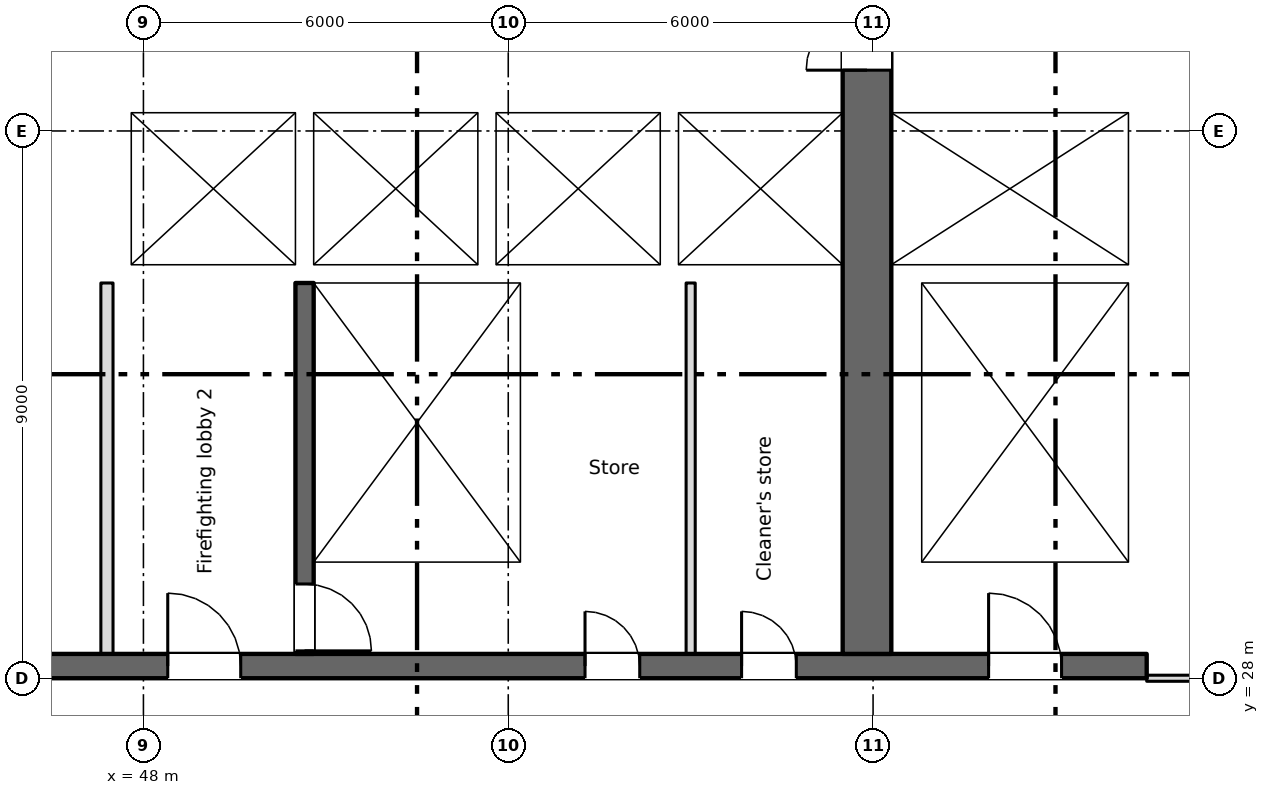
"""IFC4 building model, lengths in metres.
Left out: names, types, materials, properties, quantities, classifications, styles, units other than length and angle.
Written with IfcOpenShell. Run it as: python <this file> out.ifc"""

import sys

from ifc_helpers import new_model, si_unit, direction, frame, frame_2d, origin, place, context, subcontext, project, spatial, rectangle, extrude, element, fill, save


model = new_model("IFC4")
c1 = context("Model", 3, precision=1e-05, world=origin(), true_north=direction((0.0, 1.0)))
c2 = subcontext(c1, "Body", "Model", "MODEL_VIEW")
j1 = project(units=[si_unit("LENGTHUNIT", "METRE"), si_unit("PLANEANGLEUNIT", "RADIAN")], contexts=[c1])
p1 = place(None, origin())
s1 = spatial("IfcSite", under=j1, at=p1, CompositionType="ELEMENT")
p2 = place(p1, origin())
s2 = spatial("IfcBuilding", under=s1, at=p2, CompositionType="ELEMENT")
p3 = place(p2, frame((0.0, 0.0, 102.5)))
s3 = spatial("IfcBuildingStorey", under=s2, at=p3, CompositionType="ELEMENT", Elevation=102.5)
p4 = place(p3, frame((6.7, 28.2, 0.0), z_axis=(0.0, 0.0, 1.0), x_axis=(1.0, 0.0, 0.0)))
e1 = element("IfcWall", 1, at=p4, inside=s3, PredefinedType="SHEAR", context=c2, shape_type="SweptSolid", body=[
    extrude(rectangle(XDim=57.8, YDim=0.4, at=frame_2d((28.9, 0.0))), origin(), (0.0, 0.0, 1.0), 3.35),
])
p5 = place(p4, frame((13.85, 0.0, 0.0)))
e2 = element("IfcOpeningElement", 2, at=p5, cuts=e1, PredefinedType="OPENING", context=c2, shape_type="SweptSolid", body=[
    extrude(rectangle(XDim=0.9, YDim=2.1, at=frame_2d((0.45, 1.05))), frame((0.0, 0.21, 0.0), z_axis=(0.0, -1.0, 0.0), x_axis=(1.0, 0.0, 0.0)), (0.0, 0.0, 1.0), 0.42),
])
p6 = place(p4, frame((48.562, 0.0, 0.0)))
e3 = element("IfcOpeningElement", 3, at=p6, cuts=e1, PredefinedType="OPENING", context=c2, shape_type="SweptSolid", body=[
    extrude(rectangle(XDim=0.9, YDim=2.1, at=frame_2d((0.45, 1.05))), frame((0.0, 0.21, 0.0), z_axis=(0.0, -1.0, 0.0), x_axis=(1.0, 0.0, 0.0)), (0.0, 0.0, 1.0), 0.42),
])
p7 = place(p4, frame((51.137, 0.0, 0.0)))
e4 = element("IfcOpeningElement", 4, at=p7, cuts=e1, PredefinedType="OPENING", context=c2, shape_type="SweptSolid", body=[
    extrude(rectangle(XDim=0.9, YDim=2.1, at=frame_2d((0.45, 1.05))), frame((0.0, 0.21, 0.0), z_axis=(0.0, -1.0, 0.0), x_axis=(1.0, 0.0, 0.0)), (0.0, 0.0, 1.0), 0.42),
])
p8 = place(p4, frame((1.35, 0.0, 0.0)))
e5 = element("IfcOpeningElement", 5, at=p8, cuts=e1, PredefinedType="OPENING", context=c2, shape_type="SweptSolid", body=[
    extrude(rectangle(XDim=0.9, YDim=2.1, at=frame_2d((0.45, 1.05))), frame((0.0, 0.21, 0.0), z_axis=(0.0, -1.0, 0.0), x_axis=(1.0, 0.0, 0.0)), (0.0, 0.0, 1.0), 0.42),
])
p9 = place(p4, frame((4.7, 0.0, 0.0)))
e6 = element("IfcOpeningElement", 6, at=p9, cuts=e1, PredefinedType="OPENING", context=c2, shape_type="SweptSolid", body=[
    extrude(rectangle(XDim=1.2, YDim=2.1, at=frame_2d((0.6, 1.05))), frame((0.0, 0.21, 0.0), z_axis=(0.0, -1.0, 0.0), x_axis=(1.0, 0.0, 0.0)), (0.0, 0.0, 1.0), 0.42),
])
p10 = place(p4, frame((31.7, 0.0, 0.0)))
e7 = element("IfcOpeningElement", 7, at=p10, cuts=e1, PredefinedType="OPENING", context=c2, shape_type="SweptSolid", body=[
    extrude(rectangle(XDim=1.2, YDim=2.1, at=frame_2d((0.6, 1.05))), frame((0.0, 0.21, 0.0), z_axis=(0.0, -1.0, 0.0), x_axis=(1.0, 0.0, 0.0)), (0.0, 0.0, 1.0), 0.42),
])
p11 = place(p4, frame((55.2, 0.0, 0.0)))
e8 = element("IfcOpeningElement", 8, at=p11, cuts=e1, PredefinedType="OPENING", context=c2, shape_type="SweptSolid", body=[
    extrude(rectangle(XDim=1.2, YDim=2.1, at=frame_2d((0.6, 1.05))), frame((0.0, 0.21, 0.0), z_axis=(0.0, -1.0, 0.0), x_axis=(1.0, 0.0, 0.0)), (0.0, 0.0, 1.0), 0.42),
])
p12 = place(p4, frame((21.7, 0.0, 0.0)))
e9 = element("IfcOpeningElement", 9, at=p12, cuts=e1, PredefinedType="OPENING", context=c2, shape_type="SweptSolid", body=[
    extrude(rectangle(XDim=1.2, YDim=2.1, at=frame_2d((0.6, 1.05))), frame((0.0, 0.21, 0.0), z_axis=(0.0, -1.0, 0.0), x_axis=(1.0, 0.0, 0.0)), (0.0, 0.0, 1.0), 0.42),
])
p13 = place(p4, frame((41.7, 0.0, 0.0)))
e10 = element("IfcOpeningElement", 10, at=p13, cuts=e1, PredefinedType="OPENING", context=c2, shape_type="SweptSolid", body=[
    extrude(rectangle(XDim=1.2, YDim=2.1, at=frame_2d((0.6, 1.05))), frame((0.0, 0.21, 0.0), z_axis=(0.0, -1.0, 0.0), x_axis=(1.0, 0.0, 0.0)), (0.0, 0.0, 1.0), 0.42),
])
p14 = place(p4, frame((24.85, 0.0, 0.0)))
e11 = element("IfcOpeningElement", 11, at=p14, cuts=e1, PredefinedType="OPENING", context=c2, shape_type="SweptSolid", body=[
    extrude(rectangle(XDim=2.4, YDim=2.1, at=frame_2d((1.2, 1.05))), frame((0.0, 0.21, 0.0), z_axis=(0.0, -1.0, 0.0), x_axis=(1.0, 0.0, 0.0)), (0.0, 0.0, 1.0), 0.42),
])
p15 = place(p4, frame((37.35, 0.0, 0.0)))
e12 = element("IfcOpeningElement", 12, at=p15, cuts=e1, PredefinedType="OPENING", context=c2, shape_type="SweptSolid", body=[
    extrude(rectangle(XDim=2.4, YDim=2.1, at=frame_2d((1.2, 1.05))), frame((0.0, 0.21, 0.0), z_axis=(0.0, -1.0, 0.0), x_axis=(1.0, 0.0, 0.0)), (0.0, 0.0, 1.0), 0.42),
])
p16 = place(p4, frame((7.95, 0.0, 0.0)))
e13 = element("IfcOpeningElement", 13, at=p16, cuts=e1, PredefinedType="OPENING", context=c2, shape_type="SweptSolid", body=[
    extrude(rectangle(XDim=2.4, YDim=2.1, at=frame_2d((1.2, 1.05))), frame((0.0, 0.21, 0.0), z_axis=(0.0, -1.0, 0.0), x_axis=(1.0, 0.0, 0.0)), (0.0, 0.0, 1.0), 0.42),
])
p17 = place(p4, frame((28.85, 0.0, 0.0)))
e14 = element("IfcOpeningElement", 14, at=p17, cuts=e1, PredefinedType="OPENING", context=c2, shape_type="SweptSolid", body=[
    extrude(rectangle(XDim=0.9, YDim=2.1, at=frame_2d((0.45, 1.05))), frame((0.0, 0.21, 0.0), z_axis=(0.0, -1.0, 0.0), x_axis=(1.0, 0.0, 0.0)), (0.0, 0.0, 1.0), 0.42),
])
p18 = place(p4, frame((34.85, 0.0, 0.0)))
e15 = element("IfcOpeningElement", 15, at=p18, cuts=e1, PredefinedType="OPENING", context=c2, shape_type="SweptSolid", body=[
    extrude(rectangle(XDim=0.9, YDim=2.1, at=frame_2d((0.45, 1.05))), frame((0.0, 0.21, 0.0), z_axis=(0.0, -1.0, 0.0), x_axis=(1.0, 0.0, 0.0)), (0.0, 0.0, 1.0), 0.42),
])
p19 = place(p3, frame((64.35, 34.8, 0.0), z_axis=(0.0, 0.0, 1.0), x_axis=(0.0, 1.0, 0.0)))
e16 = element("IfcWall", 16, at=p19, inside=s3, PredefinedType="SHEAR", context=c2, shape_type="SweptSolid", body=[
    extrude(rectangle(XDim=10.4, YDim=0.3, at=frame_2d((5.2, 0.0))), origin(), (0.0, 0.0, 1.0), 3.35),
])
p20 = place(p3, frame((59.9, 28.4, 0.0), z_axis=(0.0, 0.0, 1.0), x_axis=(0.0, 1.0, 0.0)))
e17 = element("IfcWall", 17, at=p20, inside=s3, PredefinedType="SHEAR", context=c2, shape_type="SweptSolid", body=[
    extrude(rectangle(XDim=16.8, YDim=0.8, at=frame_2d((8.4, 0.0))), origin(), (0.0, 0.0, 1.0), 3.35),
])
p21 = place(p20, frame((9.6, 0.0, 0.0)))
e18 = element("IfcOpeningElement", 18, at=p21, cuts=e17, PredefinedType="OPENING", context=c2, shape_type="SweptSolid", body=[
    extrude(rectangle(XDim=2.0, YDim=2.1, at=frame_2d((1.0, 1.05))), frame((0.0, 0.41, 0.0), z_axis=(0.0, -1.0, 0.0), x_axis=(1.0, 0.0, 0.0)), (0.0, 0.0, 1.0), 0.82),
])
p22 = place(p20, frame((15.35, 0.0, 0.0)))
e19 = element("IfcOpeningElement", 19, at=p22, cuts=e17, PredefinedType="OPENING", context=c2, shape_type="SweptSolid", body=[
    extrude(rectangle(XDim=1.2, YDim=2.1, at=frame_2d((0.6, 1.05))), frame((0.0, 0.41, 0.0), z_axis=(0.0, -1.0, 0.0), x_axis=(1.0, 0.0, 0.0)), (0.0, 0.0, 1.0), 0.82),
])
p23 = place(p3, frame((50.65, 34.5, 0.0), z_axis=(0.0, 0.0, 1.0), x_axis=(0.0, -1.0, 0.0)))
e20 = element("IfcWall", 20, at=p23, inside=s3, PredefinedType="SHEAR", context=c2, shape_type="SweptSolid", body=[
    extrude(rectangle(XDim=6.1, YDim=0.3, at=frame_2d((3.05, 0.0))), origin(), (0.0, 0.0, 1.0), 3.35),
])
p24 = place(p23, frame((4.95, 0.0, 0.0)))
e21 = element("IfcOpeningElement", 21, at=p24, cuts=e20, PredefinedType="OPENING", context=c2, shape_type="SweptSolid", body=[
    extrude(rectangle(XDim=1.1, YDim=2.1, at=frame_2d((0.55, 1.05))), frame((0.0, 0.16, 0.0), z_axis=(0.0, -1.0, 0.0), x_axis=(1.0, 0.0, 0.0)), (0.0, 0.0, 1.0), 0.32),
])
p25 = place(p3, frame((54.35, 28.4, 0.0), z_axis=(0.0, 0.0, 1.0), x_axis=(0.0, 1.0, 0.0)))
e22 = element("IfcWall", 22, at=p25, inside=s3, PredefinedType="SHEAR", context=c2, shape_type="SweptSolid", body=[
    extrude(rectangle(XDim=6.1, YDim=0.3, at=frame_2d((3.05, 0.0))), origin(), (0.0, 0.0, 1.0), 3.35),
])
p26 = place(p3, frame((60.55, 28.4, 0.0), z_axis=(0.0, 0.0, 1.0), x_axis=(0.0, 1.0, 0.0)))
e23 = element("IfcWall", 23, at=p26, inside=s3, PredefinedType="SHEAR", context=c2, shape_type="SweptSolid", body=[
    extrude(rectangle(XDim=6.1, YDim=0.5, at=frame_2d((3.05, 0.0))), origin(), (0.0, 0.0, 1.0), 3.35),
])
p27 = place(p3, frame((64.35, 28.4, 0.0), z_axis=(0.0, 0.0, 1.0), x_axis=(0.0, 1.0, 0.0)))
e24 = element("IfcWall", 24, at=p27, inside=s3, PredefinedType="SHEAR", context=c2, shape_type="SweptSolid", body=[
    extrude(rectangle(XDim=6.1, YDim=0.3, at=frame_2d((3.05, 0.0))), origin(), (0.0, 0.0, 1.0), 3.35),
])
p28 = place(p3, frame((47.3, 34.65, 0.0), z_axis=(0.0, 0.0, 1.0), x_axis=(1.0, 0.0, 0.0)))
e25 = element("IfcWall", 25, at=p28, inside=s3, PredefinedType="SHEAR", context=c2, shape_type="SweptSolid", body=[
    extrude(rectangle(XDim=12.2, YDim=0.3, at=frame_2d((6.1, 0.0))), origin(), (0.0, 0.0, 1.0), 3.35),
])
p29 = place(p28, frame((1.3, 0.0, 0.0)))
e26 = element("IfcOpeningElement", 26, at=p29, cuts=e25, PredefinedType="OPENING", context=c2, shape_type="SweptSolid", body=[
    extrude(rectangle(XDim=1.1, YDim=2.1, at=frame_2d((0.55, 1.05))), frame((0.0, 0.16, 0.0), z_axis=(0.0, -1.0, 0.0), x_axis=(1.0, 0.0, 0.0)), (0.0, 0.0, 1.0), 0.32),
])
p30 = place(p3, frame((60.3, 34.65, 0.0), z_axis=(0.0, 0.0, 1.0), x_axis=(1.0, 0.0, 0.0)))
e27 = element("IfcWall", 27, at=p30, inside=s3, PredefinedType="SHEAR", context=c2, shape_type="SweptSolid", body=[
    extrude(rectangle(XDim=4.2, YDim=0.3, at=frame_2d((2.1, 0.0))), origin(), (0.0, 0.0, 1.0), 3.35),
])
p31 = place(p3, frame((47.3, 37.45, 0.0), z_axis=(0.0, 0.0, 1.0), x_axis=(1.0, 0.0, 0.0)))
e28 = element("IfcWall", 28, at=p31, inside=s3, PredefinedType="SHEAR", context=c2, shape_type="SweptSolid", body=[
    extrude(rectangle(XDim=12.2, YDim=0.3, at=frame_2d((6.1, 0.0))), origin(), (0.0, 0.0, 1.0), 3.35),
])
p32 = place(p31, frame((4.3, 0.0, 0.0)))
e29 = element("IfcOpeningElement", 29, at=p32, cuts=e28, PredefinedType="OPENING", context=c2, shape_type="SweptSolid", body=[
    extrude(rectangle(XDim=1.1, YDim=2.1, at=frame_2d((0.55, 1.05))), frame((0.0, 0.16, 0.0), z_axis=(0.0, -1.0, 0.0), x_axis=(1.0, 0.0, 0.0)), (0.0, 0.0, 1.0), 0.32),
])
p33 = place(p31, frame((7.3, 0.0, 0.0)))
e30 = element("IfcOpeningElement", 30, at=p33, cuts=e28, PredefinedType="OPENING", context=c2, shape_type="SweptSolid", body=[
    extrude(rectangle(XDim=1.1, YDim=2.1, at=frame_2d((0.55, 1.05))), frame((0.0, 0.16, 0.0), z_axis=(0.0, -1.0, 0.0), x_axis=(1.0, 0.0, 0.0)), (0.0, 0.0, 1.0), 0.32),
])
p34 = place(p31, frame((10.3, 0.0, 0.0)))
e31 = element("IfcOpeningElement", 31, at=p34, cuts=e28, PredefinedType="OPENING", context=c2, shape_type="SweptSolid", body=[
    extrude(rectangle(XDim=1.1, YDim=2.1, at=frame_2d((0.55, 1.05))), frame((0.0, 0.16, 0.0), z_axis=(0.0, -1.0, 0.0), x_axis=(1.0, 0.0, 0.0)), (0.0, 0.0, 1.0), 0.32),
])
p35 = place(p3, frame((60.3, 37.45, 0.0), z_axis=(0.0, 0.0, 1.0), x_axis=(1.0, 0.0, 0.0)))
e32 = element("IfcWall", 32, at=p35, inside=s3, PredefinedType="SHEAR", context=c2, shape_type="SweptSolid", body=[
    extrude(rectangle(XDim=3.9, YDim=0.3, at=frame_2d((1.95, 0.0))), origin(), (0.0, 0.0, 1.0), 3.35),
])
p36 = place(p35, frame((1.4, 0.0, 0.0)))
e33 = element("IfcOpeningElement", 33, at=p36, cuts=e32, PredefinedType="OPENING", context=c2, shape_type="SweptSolid", body=[
    extrude(rectangle(XDim=1.1, YDim=2.1, at=frame_2d((0.55, 1.05))), frame((0.0, 0.16, 0.0), z_axis=(0.0, -1.0, 0.0), x_axis=(1.0, 0.0, 0.0)), (0.0, 0.0, 1.0), 0.32),
])
p37 = place(p3, frame((47.55, 34.8, 0.0), z_axis=(0.0, 0.0, 1.0), x_axis=(0.0, 1.0, 0.0)))
e34 = element("IfcWall", 34, at=p37, inside=s3, PredefinedType="SHEAR", context=c2, shape_type="SweptSolid", body=[
    extrude(rectangle(XDim=2.5, YDim=0.5, at=frame_2d((1.25, 0.0))), origin(), (0.0, 0.0, 1.0), 3.35),
])
for number, where, z_axis, x_axis in (
    (35, (50.65, 34.8, 0.0), (0.0, 0.0, 1.0), (0.0, 1.0, 0.0)),
    (36, (53.65, 34.8, 0.0), (0.0, 0.0, 1.0), (0.0, 1.0, 0.0)),
    (37, (56.65, 34.8, 0.0), (0.0, 0.0, 1.0), (0.0, 1.0, 0.0)),
):
    element("IfcWall", number, at=place(p3, frame(where, z_axis=z_axis, x_axis=x_axis)), inside=s3, PredefinedType="SHEAR", context=c2, shape_type="SweptSolid", body=[
        extrude(rectangle(XDim=2.5, YDim=0.3, at=frame_2d((1.25, 0.0))), origin(), (0.0, 0.0, 1.0), 3.35),
    ])
p38 = place(p3, frame((47.4, 28.4, 0.0), z_axis=(0.0, 0.0, 1.0), x_axis=(0.0, 1.0, 0.0)))
e38 = element("IfcWall", 38, at=p38, inside=s3, PredefinedType="PARTITIONING", context=c2, shape_type="SweptSolid", body=[
    extrude(rectangle(XDim=6.1, YDim=0.2, at=frame_2d((3.05, 0.0))), origin(), (0.0, 0.0, 1.0), 3.35),
])
p39 = place(p3, frame((57.0, 28.4, 0.0), z_axis=(0.0, 0.0, 1.0), x_axis=(0.0, 1.0, 0.0)))
e39 = element("IfcWall", 39, at=p39, inside=s3, PredefinedType="PARTITIONING", context=c2, shape_type="SweptSolid", body=[
    extrude(rectangle(XDim=6.1, YDim=0.15, at=frame_2d((3.05, 0.0))), origin(), (0.0, 0.0, 1.0), 3.35),
])
p40 = place(p3, frame((64.5, 28.0, 0.0), z_axis=(0.0, 0.0, 1.0), x_axis=(1.0, 0.0, 0.0)))
e40 = element("IfcWall", 40, at=p40, inside=s3, PredefinedType="PARTITIONING", context=c2, shape_type="SweptSolid", body=[
    extrude(rectangle(XDim=6.8, YDim=0.1, at=frame_2d((3.4, 0.0))), origin(), (0.0, 0.0, 1.0), 3.35),
])
p41 = place(p40, frame((2.5, 0.0, 0.0)))
e41 = element("IfcOpeningElement", 41, at=p41, cuts=e40, PredefinedType="OPENING", context=c2, shape_type="SweptSolid", body=[
    extrude(rectangle(XDim=1.8, YDim=2.1, at=frame_2d((0.9, 1.05))), frame((0.0, 0.06, 0.0), z_axis=(0.0, -1.0, 0.0), x_axis=(1.0, 0.0, 0.0)), (0.0, 0.0, 1.0), 0.12),
])
p42 = place(p6, origin())
e42 = element("IfcDoor", 42, at=p42, inside=s3, OperationType="SINGLE_SWING_LEFT", PredefinedType="DOOR", context=c2, shape_type="SweptSolid", body=[
    extrude(rectangle(XDim=0.9, YDim=2.1, at=frame_2d((0.45, 1.05))), frame((0.0, 0.025, 0.0), z_axis=(0.0, -1.0, 0.0), x_axis=(1.0, 0.0, 0.0)), (0.0, 0.0, 1.0), 0.05),
])
fill(e3, e42)
p43 = place(p7, origin())
e43 = element("IfcDoor", 43, at=p43, inside=s3, OperationType="SINGLE_SWING_LEFT", PredefinedType="DOOR", context=c2, shape_type="SweptSolid", body=[
    extrude(rectangle(XDim=0.9, YDim=2.1, at=frame_2d((0.45, 1.05))), frame((0.0, 0.025, 0.0), z_axis=(0.0, -1.0, 0.0), x_axis=(1.0, 0.0, 0.0)), (0.0, 0.0, 1.0), 0.05),
])
fill(e4, e43)
p44 = place(p32, origin())
e44 = element("IfcDoor", 44, at=p44, inside=s3, OperationType="SLIDING_TO_LEFT", PredefinedType="DOOR", context=c2, shape_type="SweptSolid", body=[
    extrude(rectangle(XDim=1.1, YDim=2.1, at=frame_2d((0.55, 1.05))), frame((0.0, 0.025, 0.0), z_axis=(0.0, -1.0, 0.0), x_axis=(1.0, 0.0, 0.0)), (0.0, 0.0, 1.0), 0.05),
])
fill(e29, e44)
p45 = place(p33, origin())
e45 = element("IfcDoor", 45, at=p45, inside=s3, OperationType="SLIDING_TO_LEFT", PredefinedType="DOOR", context=c2, shape_type="SweptSolid", body=[
    extrude(rectangle(XDim=1.1, YDim=2.1, at=frame_2d((0.55, 1.05))), frame((0.0, 0.025, 0.0), z_axis=(0.0, -1.0, 0.0), x_axis=(1.0, 0.0, 0.0)), (0.0, 0.0, 1.0), 0.05),
])
fill(e30, e45)
p46 = place(p34, origin())
e46 = element("IfcDoor", 46, at=p46, inside=s3, OperationType="SLIDING_TO_LEFT", PredefinedType="DOOR", context=c2, shape_type="SweptSolid", body=[
    extrude(rectangle(XDim=1.1, YDim=2.1, at=frame_2d((0.55, 1.05))), frame((0.0, 0.025, 0.0), z_axis=(0.0, -1.0, 0.0), x_axis=(1.0, 0.0, 0.0)), (0.0, 0.0, 1.0), 0.05),
])
fill(e31, e46)
p47 = place(p36, origin())
e47 = element("IfcDoor", 47, at=p47, inside=s3, OperationType="SLIDING_TO_LEFT", PredefinedType="DOOR", context=c2, shape_type="SweptSolid", body=[
    extrude(rectangle(XDim=1.1, YDim=2.1, at=frame_2d((0.55, 1.05))), frame((0.0, 0.025, 0.0), z_axis=(0.0, -1.0, 0.0), x_axis=(1.0, 0.0, 0.0)), (0.0, 0.0, 1.0), 0.05),
])
fill(e33, e47)
p48 = place(p29, origin())
e48 = element("IfcDoor", 48, at=p48, inside=s3, OperationType="SLIDING_TO_LEFT", PredefinedType="DOOR", context=c2, shape_type="SweptSolid", body=[
    extrude(rectangle(XDim=1.1, YDim=2.1, at=frame_2d((0.55, 1.05))), frame((0.0, 0.025, 0.0), z_axis=(0.0, -1.0, 0.0), x_axis=(1.0, 0.0, 0.0)), (0.0, 0.0, 1.0), 0.05),
])
fill(e26, e48)
p49 = place(p24, origin())
e49 = element("IfcDoor", 49, at=p49, inside=s3, OperationType="SINGLE_SWING_RIGHT", PredefinedType="DOOR", context=c2, shape_type="SweptSolid", body=[
    extrude(rectangle(XDim=1.1, YDim=2.1, at=frame_2d((0.55, 1.05))), frame((0.0, 0.025, 0.0), z_axis=(0.0, -1.0, 0.0), x_axis=(1.0, 0.0, 0.0)), (0.0, 0.0, 1.0), 0.05),
])
fill(e21, e49)
p50 = place(p11, origin())
e50 = element("IfcDoor", 50, at=p50, inside=s3, OperationType="SINGLE_SWING_LEFT", PredefinedType="DOOR", context=c2, shape_type="SweptSolid", body=[
    extrude(rectangle(XDim=1.2, YDim=2.1, at=frame_2d((0.6, 1.05))), frame((0.0, 0.025, 0.0), z_axis=(0.0, -1.0, 0.0), x_axis=(1.0, 0.0, 0.0)), (0.0, 0.0, 1.0), 0.05),
])
fill(e8, e50)
p51 = place(p13, origin())
e51 = element("IfcDoor", 51, at=p51, inside=s3, OperationType="SINGLE_SWING_LEFT", PredefinedType="DOOR", context=c2, shape_type="SweptSolid", body=[
    extrude(rectangle(XDim=1.2, YDim=2.1, at=frame_2d((0.6, 1.05))), frame((0.0, 0.025, 0.0), z_axis=(0.0, -1.0, 0.0), x_axis=(1.0, 0.0, 0.0)), (0.0, 0.0, 1.0), 0.05),
])
fill(e10, e51)
p52 = place(p21, origin())
e52 = element("IfcDoor", 52, at=p52, inside=s3, OperationType="DOUBLE_DOOR_SINGLE_SWING", PredefinedType="DOOR", context=c2, shape_type="SweptSolid", body=[
    extrude(rectangle(XDim=2.0, YDim=2.1, at=frame_2d((1.0, 1.05))), frame((0.0, 0.025, 0.0), z_axis=(0.0, -1.0, 0.0), x_axis=(1.0, 0.0, 0.0)), (0.0, 0.0, 1.0), 0.05),
])
fill(e18, e52)
save(model, sys.argv[1])
